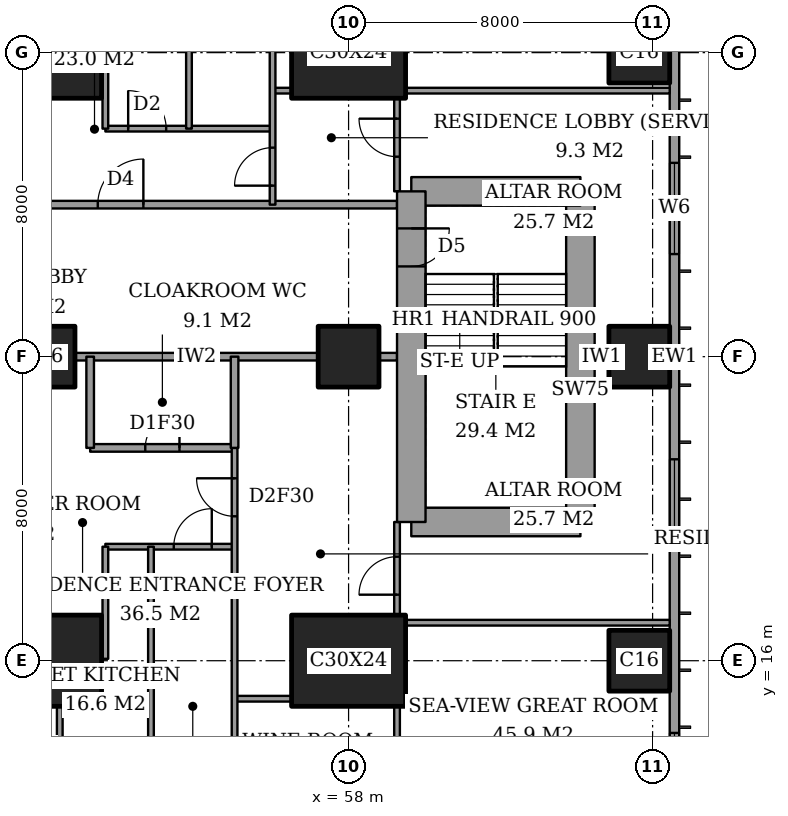
"""IFC4 building model, lengths in metres.
Left out: names, types, materials, properties, quantities, classifications, styles, units other than length and angle.
Written with IfcOpenShell. Run it as: python <this file> out.ifc"""

import sys

from ifc_helpers import new_model, si_unit, direction, frame, frame_2d, origin, origin_2d, place, context, subcontext, project, spatial, rectangle, extrude, element, fill, save


model = new_model("IFC4")
c1 = context("Model", 3, precision=1e-05, world=origin(), true_north=direction((0.0, 1.0)))
c2 = subcontext(c1, "Body", "Model", "MODEL_VIEW")
j1 = project(units=[si_unit("LENGTHUNIT", "METRE"), si_unit("PLANEANGLEUNIT", "RADIAN")], contexts=[c1])
p1 = place(None, origin())
s1 = spatial("IfcSite", under=j1, at=p1, CompositionType="ELEMENT")
p2 = place(p1, origin())
s2 = spatial("IfcBuilding", under=s1, at=p2, CompositionType="ELEMENT")
p3 = place(p2, frame((0.0, 0.0, 248.4)))
s3 = spatial("IfcBuildingStorey", under=s2, at=p3, CompositionType="ELEMENT", Elevation=248.4)
p4 = place(p3, frame((50.0, 16.0, 0.0), z_axis=(0.0, 0.0, 1.0), x_axis=(1.0, 0.0, 0.0)))
e1 = element("IfcColumn", 1, at=p4, inside=s3, PredefinedType="COLUMN", context=c2, shape_type="SweptSolid", body=[
    extrude(rectangle(XDim=3.0, YDim=2.4, at=origin_2d()), origin(), (0.0, 0.0, 1.0), 3.6),
])
p5 = place(p3, frame((50.0, 24.0, 0.0), z_axis=(0.0, 0.0, 1.0), x_axis=(1.0, 0.0, 0.0)))
e2 = element("IfcColumn", 2, at=p5, inside=s3, PredefinedType="COLUMN", context=c2, shape_type="SweptSolid", body=[
    extrude(rectangle(XDim=1.6, YDim=1.6, at=origin_2d()), origin(), (0.0, 0.0, 1.0), 3.6),
])
for number, where, z_axis, x_axis in (
    (3, (50.0, 32.0, 0.0), (0.0, 0.0, 1.0), (1.0, 0.0, 0.0)),
    (4, (58.0, 16.0, 0.0), (0.0, 0.0, 1.0), (1.0, 0.0, 0.0)),
):
    element("IfcColumn", number, at=place(p3, frame(where, z_axis=z_axis, x_axis=x_axis)), inside=s3, PredefinedType="COLUMN", context=c2, shape_type="SweptSolid", body=[
        extrude(rectangle(XDim=3.0, YDim=2.4, at=origin_2d()), origin(), (0.0, 0.0, 1.0), 3.6),
    ])
p6 = place(p3, frame((58.0, 24.0, 0.0), z_axis=(0.0, 0.0, 1.0), x_axis=(1.0, 0.0, 0.0)))
e5 = element("IfcColumn", 5, at=p6, inside=s3, PredefinedType="COLUMN", context=c2, shape_type="SweptSolid", body=[
    extrude(rectangle(XDim=1.6, YDim=1.6, at=origin_2d()), origin(), (0.0, 0.0, 1.0), 3.6),
])
p7 = place(p3, frame((58.0, 32.0, 0.0), z_axis=(0.0, 0.0, 1.0), x_axis=(1.0, 0.0, 0.0)))
e6 = element("IfcColumn", 6, at=p7, inside=s3, PredefinedType="COLUMN", context=c2, shape_type="SweptSolid", body=[
    extrude(rectangle(XDim=3.0, YDim=2.4, at=origin_2d()), origin(), (0.0, 0.0, 1.0), 3.6),
])
for number, where, z_axis, x_axis in (
    (7, (65.65, 16.0, 0.0), (0.0, 0.0, 1.0), (1.0, 0.0, 0.0)),
    (8, (65.65, 24.0, 0.0), (0.0, 0.0, 1.0), (1.0, 0.0, 0.0)),
    (9, (65.65, 32.0, 0.0), (0.0, 0.0, 1.0), (1.0, 0.0, 0.0)),
):
    element("IfcColumn", number, at=place(p3, frame(where, z_axis=z_axis, x_axis=x_axis)), inside=s3, PredefinedType="COLUMN", context=c2, shape_type="SweptSolid", body=[
        extrude(rectangle(XDim=1.6, YDim=1.6, at=origin_2d()), origin(), (0.0, 0.0, 1.0), 3.6),
    ])
p8 = place(p3, frame((59.65, 19.65, 0.0), z_axis=(0.0, 0.0, 1.0), x_axis=(1.0, 0.0, 0.0)))
e10 = element("IfcWall", 10, at=p8, inside=s3, PredefinedType="SHEAR", context=c2, shape_type="SweptSolid", body=[
    extrude(rectangle(XDim=4.45, YDim=0.75, at=frame_2d((2.225, 0.0))), origin(), (0.0, 0.0, 1.0), 3.6),
])
p9 = place(p3, frame((64.1, 19.65, 0.0), z_axis=(0.0, 0.0, 1.0), x_axis=(0.0, 1.0, 0.0)))
e11 = element("IfcWall", 11, at=p9, inside=s3, PredefinedType="SHEAR", context=c2, shape_type="SweptSolid", body=[
    extrude(rectangle(XDim=8.7, YDim=0.75, at=frame_2d((4.35, 0.0))), origin(), (0.0, 0.0, 1.0), 3.6),
])
p10 = place(p3, frame((64.1, 28.35, 0.0), z_axis=(0.0, 0.0, 1.0), x_axis=(-1.0, 0.0, 0.0)))
e12 = element("IfcWall", 12, at=p10, inside=s3, PredefinedType="SHEAR", context=c2, shape_type="SweptSolid", body=[
    extrude(rectangle(XDim=4.45, YDim=0.75, at=frame_2d((2.225, 0.0))), origin(), (0.0, 0.0, 1.0), 3.6),
])
p11 = place(p3, frame((59.65, 28.35, 0.0), z_axis=(0.0, 0.0, 1.0), x_axis=(0.0, -1.0, 0.0)))
e13 = element("IfcWall", 13, at=p11, inside=s3, PredefinedType="SHEAR", context=c2, shape_type="SweptSolid", body=[
    extrude(rectangle(XDim=8.7, YDim=0.75, at=frame_2d((4.35, 0.0))), origin(), (0.0, 0.0, 1.0), 3.6),
])
p12 = place(p11, frame((0.975, 0.0, 0.0)))
e14 = element("IfcOpeningElement", 14, at=p12, cuts=e13, PredefinedType="OPENING", context=c2, shape_type="SweptSolid", body=[
    extrude(rectangle(XDim=1.0, YDim=2.1, at=frame_2d((0.5, 1.05))), frame((0.0, 0.385, 0.0), z_axis=(0.0, -1.0, 0.0), x_axis=(1.0, 0.0, 0.0)), (0.0, 0.0, 1.0), 0.77),
])
p13 = place(p3, frame((66.575, 3.175, 0.0), z_axis=(0.0, 0.0, 1.0), x_axis=(0.0, 1.0, 0.0)))
e15 = element("IfcWall", 15, at=p13, inside=s3, PredefinedType="SOLIDWALL", context=c2, shape_type="SweptSolid", body=[
    extrude(rectangle(XDim=41.65, YDim=0.25, at=frame_2d((20.825, 0.0))), origin(), (0.0, 0.0, 1.0), 3.6),
])
p14 = place(p13, frame((0.875, 0.0, 0.6)))
e16 = element("IfcOpeningElement", 16, at=p14, cuts=e15, PredefinedType="OPENING", context=c2, shape_type="SweptSolid", body=[
    extrude(rectangle(XDim=2.4, YDim=2.0, at=frame_2d((1.2, 1.0))), frame((0.0, 0.135, 0.0), z_axis=(0.0, -1.0, 0.0), x_axis=(1.0, 0.0, 0.0)), (0.0, 0.0, 1.0), 0.27),
])
p15 = place(p13, frame((6.0, 0.0, 0.6)))
e17 = element("IfcOpeningElement", 17, at=p15, cuts=e15, PredefinedType="OPENING", context=c2, shape_type="SweptSolid", body=[
    extrude(rectangle(XDim=1.2, YDim=2.0, at=frame_2d((0.6, 1.0))), frame((0.0, 0.135, 0.0), z_axis=(0.0, -1.0, 0.0), x_axis=(1.0, 0.0, 0.0)), (0.0, 0.0, 1.0), 0.27),
])
p16 = place(p13, frame((8.525, 0.0, 0.6)))
e18 = element("IfcOpeningElement", 18, at=p16, cuts=e15, PredefinedType="OPENING", context=c2, shape_type="SweptSolid", body=[
    extrude(rectangle(XDim=2.4, YDim=2.0, at=frame_2d((1.2, 1.0))), frame((0.0, 0.135, 0.0), z_axis=(0.0, -1.0, 0.0), x_axis=(1.0, 0.0, 0.0)), (0.0, 0.0, 1.0), 0.27),
])
p17 = place(p13, frame((15.725, 0.0, 0.6)))
e19 = element("IfcOpeningElement", 19, at=p17, cuts=e15, PredefinedType="OPENING", context=c2, shape_type="SweptSolid", body=[
    extrude(rectangle(XDim=2.4, YDim=2.0, at=frame_2d((1.2, 1.0))), frame((0.0, 0.135, 0.0), z_axis=(0.0, -1.0, 0.0), x_axis=(1.0, 0.0, 0.0)), (0.0, 0.0, 1.0), 0.27),
])
p18 = place(p13, frame((23.525, 0.0, 0.6)))
e20 = element("IfcOpeningElement", 20, at=p18, cuts=e15, PredefinedType="OPENING", context=c2, shape_type="SweptSolid", body=[
    extrude(rectangle(XDim=2.4, YDim=2.0, at=frame_2d((1.2, 1.0))), frame((0.0, 0.135, 0.0), z_axis=(0.0, -1.0, 0.0), x_axis=(1.0, 0.0, 0.0)), (0.0, 0.0, 1.0), 0.27),
])
p19 = place(p13, frame((30.625, 0.0, 0.6)))
e21 = element("IfcOpeningElement", 21, at=p19, cuts=e15, PredefinedType="OPENING", context=c2, shape_type="SweptSolid", body=[
    extrude(rectangle(XDim=2.4, YDim=2.0, at=frame_2d((1.2, 1.0))), frame((0.0, 0.135, 0.0), z_axis=(0.0, -1.0, 0.0), x_axis=(1.0, 0.0, 0.0)), (0.0, 0.0, 1.0), 0.27),
])
p20 = place(p13, frame((34.325, 0.0, 0.6)))
e22 = element("IfcOpeningElement", 22, at=p20, cuts=e15, PredefinedType="OPENING", context=c2, shape_type="SweptSolid", body=[
    extrude(rectangle(XDim=1.2, YDim=2.0, at=frame_2d((0.6, 1.0))), frame((0.0, 0.135, 0.0), z_axis=(0.0, -1.0, 0.0), x_axis=(1.0, 0.0, 0.0)), (0.0, 0.0, 1.0), 0.27),
])
p21 = place(p13, frame((38.375, 0.0, 0.6)))
e23 = element("IfcOpeningElement", 23, at=p21, cuts=e15, PredefinedType="OPENING", context=c2, shape_type="SweptSolid", body=[
    extrude(rectangle(XDim=2.4, YDim=2.0, at=frame_2d((1.2, 1.0))), frame((0.0, 0.135, 0.0), z_axis=(0.0, -1.0, 0.0), x_axis=(1.0, 0.0, 0.0)), (0.0, 0.0, 1.0), 0.27),
])
p22 = place(p3, frame((55.0, 15.0, 0.0), z_axis=(0.0, 0.0, 1.0), x_axis=(1.0, 0.0, 0.0)))
e24 = element("IfcWall", 24, at=p22, inside=s3, PredefinedType="PARTITIONING", context=c2, shape_type="SweptSolid", body=[
    extrude(rectangle(XDim=1.5, YDim=0.15, at=frame_2d((0.75, 0.0))), origin(), (0.0, 0.0, 1.0), 3.35),
])
p23 = place(p3, frame((59.5, 17.0, 0.0), z_axis=(0.0, 0.0, 1.0), x_axis=(1.0, 0.0, 0.0)))
e25 = element("IfcWall", 25, at=p23, inside=s3, PredefinedType="PARTITIONING", context=c2, shape_type="SweptSolid", body=[
    extrude(rectangle(XDim=6.95, YDim=0.15, at=frame_2d((3.475, 0.0))), origin(), (0.0, 0.0, 1.0), 3.35),
])
p24 = place(p3, frame((51.6, 19.0, 0.0), z_axis=(0.0, 0.0, 1.0), x_axis=(1.0, 0.0, 0.0)))
e26 = element("IfcWall", 26, at=p24, inside=s3, PredefinedType="PARTITIONING", context=c2, shape_type="SweptSolid", body=[
    extrude(rectangle(XDim=3.4, YDim=0.15, at=frame_2d((1.7, 0.0))), origin(), (0.0, 0.0, 1.0), 3.35),
])
p25 = place(p24, frame((1.8, 0.0, 0.0)))
e27 = element("IfcOpeningElement", 27, at=p25, cuts=e26, PredefinedType="OPENING", context=c2, shape_type="SweptSolid", body=[
    extrude(rectangle(XDim=1.0, YDim=2.1, at=frame_2d((0.5, 1.05))), frame((0.0, 0.085, 0.0), z_axis=(0.0, -1.0, 0.0), x_axis=(1.0, 0.0, 0.0)), (0.0, 0.0, 1.0), 0.17),
])
p26 = place(p3, frame((51.2, 21.6, 0.0), z_axis=(0.0, 0.0, 1.0), x_axis=(1.0, 0.0, 0.0)))
e28 = element("IfcWall", 28, at=p26, inside=s3, PredefinedType="PARTITIONING", context=c2, shape_type="SweptSolid", body=[
    extrude(rectangle(XDim=3.8, YDim=0.2, at=frame_2d((1.9, 0.0))), origin(), (0.0, 0.0, 1.0), 3.35),
])
p27 = place(p26, frame((1.45, 0.0, 0.0)))
e29 = element("IfcOpeningElement", 29, at=p27, cuts=e28, PredefinedType="OPENING", context=c2, shape_type="SweptSolid", body=[
    extrude(rectangle(XDim=0.9, YDim=2.1, at=frame_2d((0.45, 1.05))), frame((0.0, 0.11, 0.0), z_axis=(0.0, -1.0, 0.0), x_axis=(1.0, 0.0, 0.0)), (0.0, 0.0, 1.0), 0.22),
])
p28 = place(p3, frame((50.8, 24.0, 0.0), z_axis=(0.0, 0.0, 1.0), x_axis=(1.0, 0.0, 0.0)))
e30 = element("IfcWall", 30, at=p28, inside=s3, PredefinedType="PARTITIONING", context=c2, shape_type="SweptSolid", body=[
    extrude(rectangle(XDim=6.4, YDim=0.2, at=frame_2d((3.2, 0.0))), origin(), (0.0, 0.0, 1.0), 3.35),
])
p29 = place(p3, frame((58.8, 24.0, 0.0), z_axis=(0.0, 0.0, 1.0), x_axis=(1.0, 0.0, 0.0)))
e31 = element("IfcWall", 31, at=p29, inside=s3, PredefinedType="PARTITIONING", context=c2, shape_type="SweptSolid", body=[
    extrude(rectangle(XDim=0.475, YDim=0.2, at=frame_2d((0.237, 0.0))), origin(), (0.0, 0.0, 1.0), 3.35),
])
p30 = place(p3, frame((64.475, 24.0, 0.0), z_axis=(0.0, 0.0, 1.0), x_axis=(1.0, 0.0, 0.0)))
e32 = element("IfcWall", 32, at=p30, inside=s3, PredefinedType="PARTITIONING", context=c2, shape_type="SweptSolid", body=[
    extrude(rectangle(XDim=0.375, YDim=0.15, at=frame_2d((0.188, 0.0))), origin(), (0.0, 0.0, 1.0), 3.35),
])
p31 = place(p3, frame((42.0, 28.0, 0.0), z_axis=(0.0, 0.0, 1.0), x_axis=(1.0, 0.0, 0.0)))
e33 = element("IfcWall", 33, at=p31, inside=s3, PredefinedType="PARTITIONING", context=c2, shape_type="SweptSolid", body=[
    extrude(rectangle(XDim=17.275, YDim=0.2, at=frame_2d((8.637, 0.0))), origin(), (0.0, 0.0, 1.0), 3.35),
])
p32 = place(p31, frame((9.4, 0.0, 0.0)))
e34 = element("IfcOpeningElement", 34, at=p32, cuts=e33, PredefinedType="OPENING", context=c2, shape_type="SweptSolid", body=[
    extrude(rectangle(XDim=1.2, YDim=2.4, at=frame_2d((0.6, 1.2))), frame((0.0, 0.11, 0.0), z_axis=(0.0, -1.0, 0.0), x_axis=(1.0, 0.0, 0.0)), (0.0, 0.0, 1.0), 0.22),
])
p33 = place(p3, frame((51.6, 30.0, 0.0), z_axis=(0.0, 0.0, 1.0), x_axis=(1.0, 0.0, 0.0)))
e35 = element("IfcWall", 35, at=p33, inside=s3, PredefinedType="PARTITIONING", context=c2, shape_type="SweptSolid", body=[
    extrude(rectangle(XDim=4.4, YDim=0.15, at=frame_2d((2.2, 0.0))), origin(), (0.0, 0.0, 1.0), 3.35),
])
p34 = place(p33, frame((0.6, 0.0, 0.0)))
e36 = element("IfcOpeningElement", 36, at=p34, cuts=e35, PredefinedType="OPENING", context=c2, shape_type="SweptSolid", body=[
    extrude(rectangle(XDim=1.0, YDim=2.1, at=frame_2d((0.5, 1.05))), frame((0.0, 0.085, 0.0), z_axis=(0.0, -1.0, 0.0), x_axis=(1.0, 0.0, 0.0)), (0.0, 0.0, 1.0), 0.17),
])
p35 = place(p3, frame((56.0, 31.0, 0.0), z_axis=(0.0, 0.0, 1.0), x_axis=(1.0, 0.0, 0.0)))
e37 = element("IfcWall", 37, at=p35, inside=s3, PredefinedType="PARTITIONING", context=c2, shape_type="SweptSolid", body=[
    extrude(rectangle(XDim=0.5, YDim=0.15, at=frame_2d((0.25, 0.0))), origin(), (0.0, 0.0, 1.0), 3.35),
])
p36 = place(p3, frame((59.5, 31.0, 0.0), z_axis=(0.0, 0.0, 1.0), x_axis=(1.0, 0.0, 0.0)))
e38 = element("IfcWall", 38, at=p36, inside=s3, PredefinedType="PARTITIONING", context=c2, shape_type="SweptSolid", body=[
    extrude(rectangle(XDim=6.95, YDim=0.15, at=frame_2d((3.475, 0.0))), origin(), (0.0, 0.0, 1.0), 3.35),
])
p37 = place(p3, frame((50.4, 10.6, 0.0), z_axis=(0.0, 0.0, 1.0), x_axis=(0.0, 1.0, 0.0)))
e39 = element("IfcWall", 39, at=p37, inside=s3, PredefinedType="PARTITIONING", context=c2, shape_type="SweptSolid", body=[
    extrude(rectangle(XDim=4.2, YDim=0.15, at=frame_2d((2.1, 0.0))), origin(), (0.0, 0.0, 1.0), 3.35),
])
p38 = place(p3, frame((51.2, 21.6, 0.0), z_axis=(0.0, 0.0, 1.0), x_axis=(0.0, 1.0, 0.0)))
e40 = element("IfcWall", 40, at=p38, inside=s3, PredefinedType="PARTITIONING", context=c2, shape_type="SweptSolid", body=[
    extrude(rectangle(XDim=2.4, YDim=0.2, at=frame_2d((1.2, 0.0))), origin(), (0.0, 0.0, 1.0), 3.35),
])
p39 = place(p3, frame((51.6, 16.05, 0.0), z_axis=(0.0, 0.0, 1.0), x_axis=(0.0, 1.0, 0.0)))
e41 = element("IfcWall", 41, at=p39, inside=s3, PredefinedType="PARTITIONING", context=c2, shape_type="SweptSolid", body=[
    extrude(rectangle(XDim=2.95, YDim=0.15, at=frame_2d((1.475, 0.0))), origin(), (0.0, 0.0, 1.0), 3.35),
])
p40 = place(p3, frame((51.6, 30.0, 0.0), z_axis=(0.0, 0.0, 1.0), x_axis=(0.0, 1.0, 0.0)))
e42 = element("IfcWall", 42, at=p40, inside=s3, PredefinedType="PARTITIONING", context=c2, shape_type="SweptSolid", body=[
    extrude(rectangle(XDim=7.2, YDim=0.15, at=frame_2d((3.6, 0.0))), origin(), (0.0, 0.0, 1.0), 3.35),
])
p41 = place(p3, frame((52.8, 10.6, 0.0), z_axis=(0.0, 0.0, 1.0), x_axis=(0.0, 1.0, 0.0)))
e43 = element("IfcWall", 43, at=p41, inside=s3, PredefinedType="PARTITIONING", context=c2, shape_type="SweptSolid", body=[
    extrude(rectangle(XDim=8.4, YDim=0.15, at=frame_2d((4.2, 0.0))), origin(), (0.0, 0.0, 1.0), 3.35),
])
p42 = place(p3, frame((53.8, 30.0, 0.0), z_axis=(0.0, 0.0, 1.0), x_axis=(0.0, 1.0, 0.0)))
e44 = element("IfcWall", 44, at=p42, inside=s3, PredefinedType="PARTITIONING", context=c2, shape_type="SweptSolid", body=[
    extrude(rectangle(XDim=7.2, YDim=0.15, at=frame_2d((3.6, 0.0))), origin(), (0.0, 0.0, 1.0), 3.35),
])
p43 = place(p3, frame((55.0, 21.6, 0.0), z_axis=(0.0, 0.0, 1.0), x_axis=(0.0, 1.0, 0.0)))
e45 = element("IfcWall", 45, at=p43, inside=s3, PredefinedType="PARTITIONING", context=c2, shape_type="SweptSolid", body=[
    extrude(rectangle(XDim=2.4, YDim=0.2, at=frame_2d((1.2, 0.0))), origin(), (0.0, 0.0, 1.0), 3.35),
])
p44 = place(p3, frame((55.0, 10.6, 0.0), z_axis=(0.0, 0.0, 1.0), x_axis=(0.0, 1.0, 0.0)))
e46 = element("IfcWall", 46, at=p44, inside=s3, PredefinedType="PARTITIONING", context=c2, shape_type="SweptSolid", body=[
    extrude(rectangle(XDim=11.0, YDim=0.15, at=frame_2d((5.5, 0.0))), origin(), (0.0, 0.0, 1.0), 3.35),
])
p45 = place(p44, frame((9.2, 0.0, 0.0)))
e47 = element("IfcOpeningElement", 47, at=p45, cuts=e46, PredefinedType="OPENING", context=c2, shape_type="SweptSolid", body=[
    extrude(rectangle(XDim=1.0, YDim=2.1, at=frame_2d((0.5, 1.05))), frame((0.0, 0.085, 0.0), z_axis=(0.0, -1.0, 0.0), x_axis=(1.0, 0.0, 0.0)), (0.0, 0.0, 1.0), 0.17),
])
p46 = place(p3, frame((56.0, 28.0, 0.0), z_axis=(0.0, 0.0, 1.0), x_axis=(0.0, 1.0, 0.0)))
e48 = element("IfcWall", 48, at=p46, inside=s3, PredefinedType="PARTITIONING", context=c2, shape_type="SweptSolid", body=[
    extrude(rectangle(XDim=9.2, YDim=0.15, at=frame_2d((4.6, 0.0))), origin(), (0.0, 0.0, 1.0), 3.35),
])
p47 = place(p46, frame((0.5, 0.0, 0.0)))
e49 = element("IfcOpeningElement", 49, at=p47, cuts=e48, PredefinedType="OPENING", context=c2, shape_type="SweptSolid", body=[
    extrude(rectangle(XDim=1.0, YDim=2.1, at=frame_2d((0.5, 1.05))), frame((0.0, 0.085, 0.0), z_axis=(0.0, -1.0, 0.0), x_axis=(1.0, 0.0, 0.0)), (0.0, 0.0, 1.0), 0.17),
])
p48 = place(p3, frame((59.275, 10.6, 0.0), z_axis=(0.0, 0.0, 1.0), x_axis=(0.0, 1.0, 0.0)))
e50 = element("IfcWall", 50, at=p48, inside=s3, PredefinedType="PARTITIONING", context=c2, shape_type="SweptSolid", body=[
    extrude(rectangle(XDim=4.2, YDim=0.15, at=frame_2d((2.1, 0.0))), origin(), (0.0, 0.0, 1.0), 3.35),
])
p49 = place(p3, frame((59.275, 17.2, 0.0), z_axis=(0.0, 0.0, 1.0), x_axis=(0.0, 1.0, 0.0)))
e51 = element("IfcWall", 51, at=p49, inside=s3, PredefinedType="PARTITIONING", context=c2, shape_type="SweptSolid", body=[
    extrude(rectangle(XDim=2.45, YDim=0.15, at=frame_2d((1.225, 0.0))), origin(), (0.0, 0.0, 1.0), 3.35),
])
p50 = place(p49, frame((0.538, 0.0, 0.0)))
e52 = element("IfcOpeningElement", 52, at=p50, cuts=e51, PredefinedType="OPENING", context=c2, shape_type="SweptSolid", body=[
    extrude(rectangle(XDim=1.0, YDim=2.1, at=frame_2d((0.5, 1.05))), frame((0.0, 0.085, 0.0), z_axis=(0.0, -1.0, 0.0), x_axis=(1.0, 0.0, 0.0)), (0.0, 0.0, 1.0), 0.17),
])
p51 = place(p3, frame((59.275, 28.35, 0.0), z_axis=(0.0, 0.0, 1.0), x_axis=(0.0, 1.0, 0.0)))
e53 = element("IfcWall", 53, at=p51, inside=s3, PredefinedType="PARTITIONING", context=c2, shape_type="SweptSolid", body=[
    extrude(rectangle(XDim=2.45, YDim=0.15, at=frame_2d((1.225, 0.0))), origin(), (0.0, 0.0, 1.0), 3.35),
])
p52 = place(p51, frame((0.913, 0.0, 0.0)))
e54 = element("IfcOpeningElement", 54, at=p52, cuts=e53, PredefinedType="OPENING", context=c2, shape_type="SweptSolid", body=[
    extrude(rectangle(XDim=1.0, YDim=2.1, at=frame_2d((0.5, 1.05))), frame((0.0, 0.085, 0.0), z_axis=(0.0, -1.0, 0.0), x_axis=(1.0, 0.0, 0.0)), (0.0, 0.0, 1.0), 0.17),
])
p53 = place(p16, origin())
e55 = element("IfcWindow", 55, at=p53, inside=s3, PartitioningType="SINGLE_PANEL", PredefinedType="WINDOW", context=c2, shape_type="SweptSolid", body=[
    extrude(rectangle(XDim=2.4, YDim=2.0, at=frame_2d((1.2, 1.0))), frame((0.0, 0.03, 0.0), z_axis=(0.0, -1.0, 0.0), x_axis=(1.0, 0.0, 0.0)), (0.0, 0.0, 1.0), 0.06),
])
fill(e18, e55)
p54 = place(p17, origin())
e56 = element("IfcWindow", 56, at=p54, inside=s3, PartitioningType="SINGLE_PANEL", PredefinedType="WINDOW", context=c2, shape_type="SweptSolid", body=[
    extrude(rectangle(XDim=2.4, YDim=2.0, at=frame_2d((1.2, 1.0))), frame((0.0, 0.03, 0.0), z_axis=(0.0, -1.0, 0.0), x_axis=(1.0, 0.0, 0.0)), (0.0, 0.0, 1.0), 0.06),
])
fill(e19, e56)
p55 = place(p18, origin())
e57 = element("IfcWindow", 57, at=p55, inside=s3, PartitioningType="SINGLE_PANEL", PredefinedType="WINDOW", context=c2, shape_type="SweptSolid", body=[
    extrude(rectangle(XDim=2.4, YDim=2.0, at=frame_2d((1.2, 1.0))), frame((0.0, 0.03, 0.0), z_axis=(0.0, -1.0, 0.0), x_axis=(1.0, 0.0, 0.0)), (0.0, 0.0, 1.0), 0.06),
])
fill(e20, e57)
p56 = place(p50, origin())
e58 = element("IfcDoor", 58, at=p56, inside=s3, OperationType="SINGLE_SWING_RIGHT", PredefinedType="DOOR", context=c2, shape_type="SweptSolid", body=[
    extrude(rectangle(XDim=1.0, YDim=2.1, at=frame_2d((0.5, 1.05))), frame((0.0, 0.025, 0.0), z_axis=(0.0, -1.0, 0.0), x_axis=(1.0, 0.0, 0.0)), (0.0, 0.0, 1.0), 0.05),
])
fill(e52, e58)
p57 = place(p45, origin())
e59 = element("IfcDoor", 59, at=p57, inside=s3, OperationType="SINGLE_SWING_LEFT", PredefinedType="DOOR", context=c2, shape_type="SweptSolid", body=[
    extrude(rectangle(XDim=1.0, YDim=2.1, at=frame_2d((0.5, 1.05))), frame((0.0, 0.025, 0.0), z_axis=(0.0, -1.0, 0.0), x_axis=(1.0, 0.0, 0.0)), (0.0, 0.0, 1.0), 0.05),
])
fill(e47, e59)
p58 = place(p27, origin())
e60 = element("IfcDoor", 60, at=p58, inside=s3, OperationType="SINGLE_SWING_LEFT", PredefinedType="DOOR", context=c2, shape_type="SweptSolid", body=[
    extrude(rectangle(XDim=0.9, YDim=2.1, at=frame_2d((0.45, 1.05))), frame((0.0, 0.025, 0.0), z_axis=(0.0, -1.0, 0.0), x_axis=(1.0, 0.0, 0.0)), (0.0, 0.0, 1.0), 0.05),
])
fill(e29, e60)
p59 = place(p25, origin())
e61 = element("IfcDoor", 61, at=p59, inside=s3, OperationType="SINGLE_SWING_LEFT", PredefinedType="DOOR", context=c2, shape_type="SweptSolid", body=[
    extrude(rectangle(XDim=1.0, YDim=2.1, at=frame_2d((0.5, 1.05))), frame((0.0, 0.025, 0.0), z_axis=(0.0, -1.0, 0.0), x_axis=(1.0, 0.0, 0.0)), (0.0, 0.0, 1.0), 0.05),
])
fill(e27, e61)
p60 = place(p52, origin())
e62 = element("IfcDoor", 62, at=p60, inside=s3, OperationType="SINGLE_SWING_LEFT", PredefinedType="DOOR", context=c2, shape_type="SweptSolid", body=[
    extrude(rectangle(XDim=1.0, YDim=2.1, at=frame_2d((0.5, 1.05))), frame((0.0, 0.025, 0.0), z_axis=(0.0, -1.0, 0.0), x_axis=(1.0, 0.0, 0.0)), (0.0, 0.0, 1.0), 0.05),
])
fill(e54, e62)
p61 = place(p47, origin())
e63 = element("IfcDoor", 63, at=p61, inside=s3, OperationType="SINGLE_SWING_RIGHT", PredefinedType="DOOR", context=c2, shape_type="SweptSolid", body=[
    extrude(rectangle(XDim=1.0, YDim=2.1, at=frame_2d((0.5, 1.05))), frame((0.0, 0.025, 0.0), z_axis=(0.0, -1.0, 0.0), x_axis=(1.0, 0.0, 0.0)), (0.0, 0.0, 1.0), 0.05),
])
fill(e49, e63)
p62 = place(p32, origin())
e64 = element("IfcDoor", 64, at=p62, inside=s3, OperationType="SINGLE_SWING_LEFT", PredefinedType="DOOR", context=c2, shape_type="SweptSolid", body=[
    extrude(rectangle(XDim=1.2, YDim=2.4, at=frame_2d((0.6, 1.2))), frame((0.0, 0.025, 0.0), z_axis=(0.0, -1.0, 0.0), x_axis=(1.0, 0.0, 0.0)), (0.0, 0.0, 1.0), 0.05),
])
fill(e34, e64)
p63 = place(p34, origin())
e65 = element("IfcDoor", 65, at=p63, inside=s3, OperationType="SINGLE_SWING_RIGHT", PredefinedType="DOOR", context=c2, shape_type="SweptSolid", body=[
    extrude(rectangle(XDim=1.0, YDim=2.1, at=frame_2d((0.5, 1.05))), frame((0.0, 0.025, 0.0), z_axis=(0.0, -1.0, 0.0), x_axis=(1.0, 0.0, 0.0)), (0.0, 0.0, 1.0), 0.05),
])
fill(e36, e65)
p64 = place(p12, origin())
e66 = element("IfcDoor", 66, at=p64, inside=s3, OperationType="SINGLE_SWING_RIGHT", PredefinedType="DOOR", context=c2, shape_type="SweptSolid", body=[
    extrude(rectangle(XDim=1.0, YDim=2.1, at=frame_2d((0.5, 1.05))), frame((0.0, 0.025, 0.0), z_axis=(0.0, -1.0, 0.0), x_axis=(1.0, 0.0, 0.0)), (0.0, 0.0, 1.0), 0.05),
])
fill(e14, e66)
save(model, sys.argv[1])
